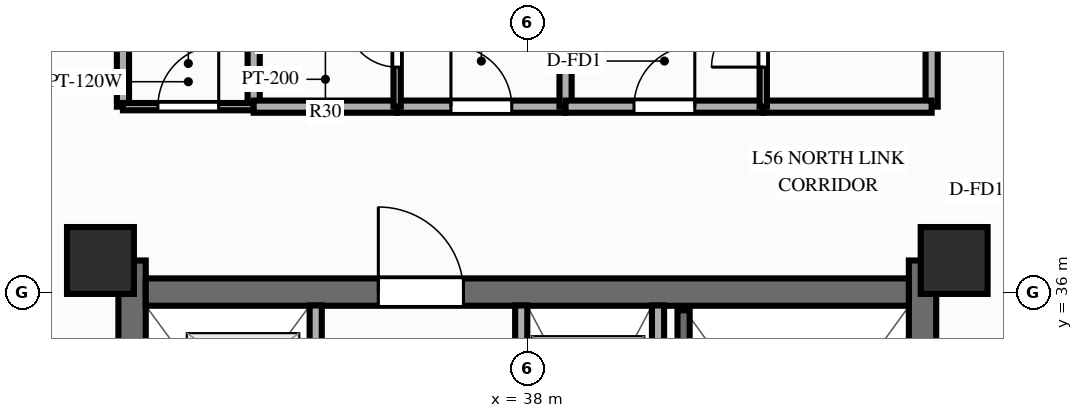
"""IFC4 building model, lengths in metres.
Left out: names, types, materials, properties, quantities, classifications, styles, units other than length and angle.
Written with IfcOpenShell. Run it as: python <this file> out.ifc"""

import sys

from ifc_helpers import new_model, si_unit, direction, frame, frame_2d, origin, origin_2d, place, context, subcontext, project, spatial, rectangle, extrude, source, transform, mapped, element, fill, save


model = new_model("IFC4")
c1 = context("Model", 3, precision=1e-05, world=origin(), true_north=direction((0.0, 1.0)))
c2 = subcontext(c1, "Body", "Model", "MODEL_VIEW")
j1 = project(units=[si_unit("LENGTHUNIT", "METRE"), si_unit("PLANEANGLEUNIT", "RADIAN")], contexts=[c1])
p1 = place(None, origin())
s1 = spatial("IfcSite", under=j1, at=p1, CompositionType="ELEMENT")
p2 = place(p1, origin())
s2 = spatial("IfcBuilding", under=s1, at=p2, CompositionType="ELEMENT")
p3 = place(p2, frame((0.0, 0.0, 179.8)))
s3 = spatial("IfcBuildingStorey", under=s2, at=p3, CompositionType="ELEMENT", Elevation=179.8)
p4 = place(p3, frame((31.5, 17.48, 0.0), z_axis=(0.0, 0.0, 1.0), x_axis=(0.0, 1.0, 0.0)))
e1 = element("IfcWall", 1, at=p4, inside=s3, PredefinedType="SHEAR", context=c2, shape_type="SweptSolid", body=[
    extrude(rectangle(XDim=19.04, YDim=0.45, at=frame_2d((9.52, 0.0))), origin(), (0.0, 0.0, 1.0), 3.0),
])
p5 = place(p4, frame((6.32, 0.0, 0.0)))
e2 = element("IfcOpeningElement", 2, at=p5, cuts=e1, PredefinedType="OPENING", context=c2, shape_type="SweptSolid", body=[
    extrude(rectangle(XDim=1.1, YDim=2.15, at=frame_2d((0.55, 1.075))), frame((0.0, 0.237, 0.0), z_axis=(0.0, -1.0, 0.0), x_axis=(1.0, 0.0, 0.0)), (0.0, 0.0, 1.0), 0.474),
])
p6 = place(p3, frame((44.5, 17.48, 0.0), z_axis=(0.0, 0.0, 1.0), x_axis=(0.0, 1.0, 0.0)))
e3 = element("IfcWall", 3, at=p6, inside=s3, PredefinedType="SHEAR", context=c2, shape_type="SweptSolid", body=[
    extrude(rectangle(XDim=19.04, YDim=0.45, at=frame_2d((9.52, 0.0))), origin(), (0.0, 0.0, 1.0), 3.0),
])
p7 = place(p6, frame((12.67, 0.0, 0.0), z_axis=(0.0, 0.0, 1.0), x_axis=(-1.0, 0.0, 0.0)))
e4 = element("IfcOpeningElement", 4, at=p7, cuts=e3, PredefinedType="OPENING", context=c2, shape_type="SweptSolid", body=[
    extrude(rectangle(XDim=1.1, YDim=2.15, at=frame_2d((0.55, 1.075))), frame((0.0, 0.237, 0.0), z_axis=(0.0, -1.0, 0.0), x_axis=(1.0, 0.0, 0.0)), (0.0, 0.0, 1.0), 0.474),
])
p8 = place(p3, frame((31.725, 36.0, 0.0), z_axis=(0.0, 0.0, 1.0), x_axis=(1.0, 0.0, 0.0)))
e5 = element("IfcWall", 5, at=p8, inside=s3, PredefinedType="SHEAR", context=c2, shape_type="SweptSolid", body=[
    extrude(rectangle(XDim=12.55, YDim=0.45, at=frame_2d((6.275, 0.0))), origin(), (0.0, 0.0, 1.0), 3.0),
])
p9 = place(p8, frame((5.225, 0.0, 0.0), z_axis=(0.0, 0.0, 1.0), x_axis=(-1.0, 0.0, 0.0)))
e6 = element("IfcOpeningElement", 6, at=p9, cuts=e5, PredefinedType="OPENING", context=c2, shape_type="SweptSolid", body=[
    extrude(rectangle(XDim=1.4, YDim=2.15, at=frame_2d((0.7, 1.075))), frame((0.0, 0.237, 0.0), z_axis=(0.0, -1.0, 0.0), x_axis=(1.0, 0.0, 0.0)), (0.0, 0.0, 1.0), 0.474),
])
m1 = source(origin(), c2, "Body", "SweptSolid", [
    extrude(rectangle(XDim=1.1, YDim=1.1, at=origin_2d()), origin(), (0.0, 0.0, 1.0), 3.0),
])
for number, where, z_axis, x_axis in (
    (7, (30.98, 36.52, 0.0), (0.0, 0.0, 1.0), (1.0, 0.0, 0.0)),
    (8, (45.02, 36.52, 0.0), (0.0, 0.0, 1.0), (1.0, 0.0, 0.0)),
):
    element("IfcColumn", number, at=place(p3, frame(where, z_axis=z_axis, x_axis=x_axis)), inside=s3, PredefinedType="COLUMN", context=c2, shape_type="MappedRepresentation", body=[
        mapped(m1, transform((0.0, 0.0, 0.0), scale=1.0)),
    ])
p10 = place(p3, frame((40.15, 31.8, 0.0), z_axis=(0.0, 0.0, 1.0), x_axis=(0.0, 1.0, 0.0)))
e9 = element("IfcWall", 9, at=p10, inside=s3, PredefinedType="PARTITIONING", context=c2, shape_type="SweptSolid", body=[
    extrude(rectangle(XDim=3.98, YDim=0.2, at=frame_2d((1.99, 0.0))), origin(), (0.0, 0.0, 1.0), 2.79),
])
p11 = place(p3, frame((40.57, 28.65, 0.0), z_axis=(0.0, 0.0, 1.0), x_axis=(0.0, 1.0, 0.0)))
e10 = element("IfcWall", 10, at=p11, inside=s3, PredefinedType="SOLIDWALL", context=c2, shape_type="SweptSolid", body=[
    extrude(rectangle(XDim=7.05, YDim=0.2, at=frame_2d((3.525, 0.0))), origin(), (0.0, 0.0, 1.0), 2.79),
])
p12 = place(p3, frame((34.52, 25.44, 0.0), z_axis=(0.0, 0.0, 1.0), x_axis=(0.0, 1.0, 0.0)))
e11 = element("IfcWall", 11, at=p12, inside=s3, PredefinedType="PARTITIONING", context=c2, shape_type="SweptSolid", body=[
    extrude(rectangle(XDim=10.34, YDim=0.2, at=frame_2d((5.17, 0.0))), origin(), (0.0, 0.0, 1.0), 2.79),
])
p13 = place(p12, frame((0.65, 0.0, 0.0)))
e12 = element("IfcOpeningElement", 12, at=p13, cuts=e11, PredefinedType="OPENING", context=c2, shape_type="SweptSolid", body=[
    extrude(rectangle(XDim=0.8, YDim=2.05, at=frame_2d((0.4, 1.025))), frame((0.0, 0.112, 0.0), z_axis=(0.0, -1.0, 0.0), x_axis=(1.0, 0.0, 0.0)), (0.0, 0.0, 1.0), 0.224),
])
p14 = place(p12, frame((2.75, 0.0, 0.0)))
e13 = element("IfcOpeningElement", 13, at=p14, cuts=e11, PredefinedType="OPENING", context=c2, shape_type="SweptSolid", body=[
    extrude(rectangle(XDim=0.8, YDim=2.05, at=frame_2d((0.4, 1.025))), frame((0.0, 0.112, 0.0), z_axis=(0.0, -1.0, 0.0), x_axis=(1.0, 0.0, 0.0)), (0.0, 0.0, 1.0), 0.224),
])
p15 = place(p12, frame((4.95, 0.0, 0.0)))
e14 = element("IfcOpeningElement", 14, at=p15, cuts=e11, PredefinedType="OPENING", context=c2, shape_type="SweptSolid", body=[
    extrude(rectangle(XDim=0.8, YDim=2.05, at=frame_2d((0.4, 1.025))), frame((0.0, 0.112, 0.0), z_axis=(0.0, -1.0, 0.0), x_axis=(1.0, 0.0, 0.0)), (0.0, 0.0, 1.0), 0.224),
])
p16 = place(p12, frame((7.01, 0.0, 0.0)))
e15 = element("IfcOpeningElement", 15, at=p16, cuts=e11, PredefinedType="OPENING", context=c2, shape_type="SweptSolid", body=[
    extrude(rectangle(XDim=1.0, YDim=2.15, at=frame_2d((0.5, 1.075))), frame((0.0, 0.112, 0.0), z_axis=(0.0, -1.0, 0.0), x_axis=(1.0, 0.0, 0.0)), (0.0, 0.0, 1.0), 0.224),
])
p17 = place(p12, frame((8.76, 0.0, 0.0)))
e16 = element("IfcOpeningElement", 16, at=p17, cuts=e11, PredefinedType="OPENING", context=c2, shape_type="SweptSolid", body=[
    extrude(rectangle(XDim=1.0, YDim=2.15, at=frame_2d((0.5, 1.075))), frame((0.0, 0.112, 0.0), z_axis=(0.0, -1.0, 0.0), x_axis=(1.0, 0.0, 0.0)), (0.0, 0.0, 1.0), 0.224),
])
p18 = place(p3, frame((37.9, 25.44, 0.0), z_axis=(0.0, 0.0, 1.0), x_axis=(0.0, 1.0, 0.0)))
e17 = element("IfcWall", 17, at=p18, inside=s3, PredefinedType="PARTITIONING", context=c2, shape_type="SweptSolid", body=[
    extrude(rectangle(XDim=10.34, YDim=0.2, at=frame_2d((5.17, 0.0))), origin(), (0.0, 0.0, 1.0), 2.79),
])
p19 = place(p18, frame((1.15, 0.0, 0.0)))
e18 = element("IfcOpeningElement", 18, at=p19, cuts=e17, PredefinedType="OPENING", context=c2, shape_type="SweptSolid", body=[
    extrude(rectangle(XDim=0.9, YDim=2.1, at=frame_2d((0.45, 1.05))), frame((0.0, 0.112, 0.0), z_axis=(0.0, -1.0, 0.0), x_axis=(1.0, 0.0, 0.0)), (0.0, 0.0, 1.0), 0.224),
])
p20 = place(p18, frame((4.2, 0.0, 0.0)))
e19 = element("IfcOpeningElement", 19, at=p20, cuts=e17, PredefinedType="OPENING", context=c2, shape_type="SweptSolid", body=[
    extrude(rectangle(XDim=0.9, YDim=2.1, at=frame_2d((0.45, 1.05))), frame((0.0, 0.112, 0.0), z_axis=(0.0, -1.0, 0.0), x_axis=(1.0, 0.0, 0.0)), (0.0, 0.0, 1.0), 0.224),
])
p21 = place(p18, frame((6.86, 0.0, 0.0)))
e20 = element("IfcOpeningElement", 20, at=p21, cuts=e17, PredefinedType="OPENING", context=c2, shape_type="SweptSolid", body=[
    extrude(rectangle(XDim=1.0, YDim=2.15, at=frame_2d((0.5, 1.075))), frame((0.0, 0.112, 0.0), z_axis=(0.0, -1.0, 0.0), x_axis=(1.0, 0.0, 0.0)), (0.0, 0.0, 1.0), 0.224),
])
p22 = place(p18, frame((8.71, 0.0, 0.0)))
e21 = element("IfcOpeningElement", 21, at=p22, cuts=e17, PredefinedType="OPENING", context=c2, shape_type="SweptSolid", body=[
    extrude(rectangle(XDim=1.0, YDim=2.15, at=frame_2d((0.5, 1.075))), frame((0.0, 0.112, 0.0), z_axis=(0.0, -1.0, 0.0), x_axis=(1.0, 0.0, 0.0)), (0.0, 0.0, 1.0), 0.224),
])
for number, where, z_axis, x_axis in (
    (22, (31.35, 39.05, 0.0), (0.0, 0.0, 1.0), (0.0, 1.0, 0.0)),
    (23, (44.65, 39.05, 0.0), (0.0, 0.0, 1.0), (0.0, 1.0, 0.0)),
):
    element("IfcWall", number, at=place(p3, frame(where, z_axis=z_axis, x_axis=x_axis)), inside=s3, PredefinedType="PARTITIONING", context=c2, shape_type="SweptSolid", body=[
        extrude(rectangle(XDim=8.8, YDim=0.2, at=frame_2d((4.4, 0.0))), origin(), (0.0, 0.0, 1.0), 2.39),
    ])
p23 = place(p3, frame((33.5, 39.05, 0.0), z_axis=(0.0, 0.0, 1.0), x_axis=(0.0, 1.0, 0.0)))
e24 = element("IfcWall", 24, at=p23, inside=s3, PredefinedType="PARTITIONING", context=c2, shape_type="SweptSolid", body=[
    extrude(rectangle(XDim=8.8, YDim=0.2, at=frame_2d((4.4, 0.0))), origin(), (0.0, 0.0, 1.0), 2.79),
])
p24 = place(p3, frame((31.35, 39.05, 0.0), z_axis=(0.0, 0.0, 1.0), x_axis=(1.0, 0.0, 0.0)))
e25 = element("IfcWall", 25, at=p24, inside=s3, PredefinedType="PARTITIONING", context=c2, shape_type="SweptSolid", body=[
    extrude(rectangle(XDim=2.15, YDim=0.12, at=frame_2d((1.075, 0.0))), origin(), (0.0, 0.0, 1.0), 2.79),
])
p25 = place(p24, frame((0.575, 0.0, 0.0)))
e26 = element("IfcOpeningElement", 26, at=p25, cuts=e25, PredefinedType="OPENING", context=c2, shape_type="SweptSolid", body=[
    extrude(rectangle(XDim=1.0, YDim=2.1, at=frame_2d((0.5, 1.05))), frame((0.0, 0.072, 0.0), z_axis=(0.0, -1.0, 0.0), x_axis=(1.0, 0.0, 0.0)), (0.0, 0.0, 1.0), 0.144),
])
p26 = place(p3, frame((33.5, 39.05, 0.0), z_axis=(0.0, 0.0, 1.0), x_axis=(1.0, 0.0, 0.0)))
e27 = element("IfcWall", 27, at=p26, inside=s3, PredefinedType="PARTITIONING", context=c2, shape_type="SweptSolid", body=[
    extrude(rectangle(XDim=2.359, YDim=0.2, at=frame_2d((1.18, 0.0))), origin(), (0.0, 0.0, 1.0), 2.79),
])
p27 = place(p3, frame((35.859, 39.05, 0.0), z_axis=(0.0, 0.0, 1.0), x_axis=(1.0, 0.0, 0.0)))
e28 = element("IfcWall", 28, at=p27, inside=s3, PredefinedType="PARTITIONING", context=c2, shape_type="SweptSolid", body=[
    extrude(rectangle(XDim=2.77, YDim=0.2, at=frame_2d((1.385, 0.0))), origin(), (0.0, 0.0, 1.0), 2.79),
])
p28 = place(p27, frame((0.885, 0.0, 0.0)))
e29 = element("IfcOpeningElement", 29, at=p28, cuts=e28, PredefinedType="OPENING", context=c2, shape_type="SweptSolid", body=[
    extrude(rectangle(XDim=1.0, YDim=2.15, at=frame_2d((0.5, 1.075))), frame((0.0, 0.112, 0.0), z_axis=(0.0, -1.0, 0.0), x_axis=(1.0, 0.0, 0.0)), (0.0, 0.0, 1.0), 0.224),
])
p29 = place(p3, frame((35.859, 39.05, 0.0), z_axis=(0.0, 0.0, 1.0), x_axis=(0.0, 1.0, 0.0)))
e30 = element("IfcWall", 30, at=p29, inside=s3, PredefinedType="PARTITIONING", context=c2, shape_type="SweptSolid", body=[
    extrude(rectangle(XDim=2.15, YDim=0.12, at=frame_2d((1.075, 0.0))), origin(), (0.0, 0.0, 1.0), 2.79),
])
p30 = place(p29, frame((0.65, 0.0, 0.0)))
e31 = element("IfcOpeningElement", 31, at=p30, cuts=e30, PredefinedType="OPENING", context=c2, shape_type="SweptSolid", body=[
    extrude(rectangle(XDim=0.85, YDim=2.05, at=frame_2d((0.425, 1.025))), frame((0.0, 0.072, 0.0), z_axis=(0.0, -1.0, 0.0), x_axis=(1.0, 0.0, 0.0)), (0.0, 0.0, 1.0), 0.144),
])
p31 = place(p3, frame((38.629, 39.05, 0.0), z_axis=(0.0, 0.0, 1.0), x_axis=(0.0, 1.0, 0.0)))
e32 = element("IfcWall", 32, at=p31, inside=s3, PredefinedType="PARTITIONING", context=c2, shape_type="SweptSolid", body=[
    extrude(rectangle(XDim=8.8, YDim=0.2, at=frame_2d((4.4, 0.0))), origin(), (0.0, 0.0, 1.0), 2.79),
])
p32 = place(p3, frame((38.629, 39.05, 0.0), z_axis=(0.0, 0.0, 1.0), x_axis=(1.0, 0.0, 0.0)))
e33 = element("IfcWall", 33, at=p32, inside=s3, PredefinedType="PARTITIONING", context=c2, shape_type="SweptSolid", body=[
    extrude(rectangle(XDim=3.251, YDim=0.2, at=frame_2d((1.626, 0.0))), origin(), (0.0, 0.0, 1.0), 2.79),
])
p33 = place(p32, frame((1.126, 0.0, 0.0)))
e34 = element("IfcOpeningElement", 34, at=p33, cuts=e33, PredefinedType="OPENING", context=c2, shape_type="SweptSolid", body=[
    extrude(rectangle(XDim=1.0, YDim=2.15, at=frame_2d((0.5, 1.075))), frame((0.0, 0.112, 0.0), z_axis=(0.0, -1.0, 0.0), x_axis=(1.0, 0.0, 0.0)), (0.0, 0.0, 1.0), 0.224),
])
p34 = place(p3, frame((41.88, 39.05, 0.0), z_axis=(0.0, 0.0, 1.0), x_axis=(1.0, 0.0, 0.0)))
e35 = element("IfcWall", 35, at=p34, inside=s3, PredefinedType="PARTITIONING", context=c2, shape_type="SweptSolid", body=[
    extrude(rectangle(XDim=2.77, YDim=0.2, at=frame_2d((1.385, 0.0))), origin(), (0.0, 0.0, 1.0), 2.79),
])
p35 = place(p3, frame((41.88, 39.05, 0.0), z_axis=(0.0, 0.0, 1.0), x_axis=(0.0, 1.0, 0.0)))
e36 = element("IfcWall", 36, at=p35, inside=s3, PredefinedType="PARTITIONING", context=c2, shape_type="SweptSolid", body=[
    extrude(rectangle(XDim=2.15, YDim=0.12, at=frame_2d((1.075, 0.0))), origin(), (0.0, 0.0, 1.0), 2.79),
])
p36 = place(p35, frame((0.65, 0.0, 0.0)))
e37 = element("IfcOpeningElement", 37, at=p36, cuts=e36, PredefinedType="OPENING", context=c2, shape_type="SweptSolid", body=[
    extrude(rectangle(XDim=0.85, YDim=2.05, at=frame_2d((0.425, 1.025))), frame((0.0, 0.072, 0.0), z_axis=(0.0, -1.0, 0.0), x_axis=(1.0, 0.0, 0.0)), (0.0, 0.0, 1.0), 0.144),
])
m2 = source(origin(), c2, "Body", "SweptSolid", [
    extrude(rectangle(XDim=1.4, YDim=2.15, at=frame_2d((0.7, 1.075))), frame((0.0, 0.025, 0.0), z_axis=(0.0, -1.0, 0.0), x_axis=(1.0, 0.0, 0.0)), (0.0, 0.0, 1.0), 0.05),
])
p37 = place(p9, origin())
e38 = element("IfcDoor", 38, at=p37, inside=s3, OperationType="SINGLE_SWING_RIGHT", PredefinedType="DOOR", context=c2, shape_type="MappedRepresentation", body=[
    mapped(m2, transform((0.0, 0.0, 0.0), scale=1.0)),
])
fill(e6, e38)
m3 = source(origin(), c2, "Body", "SweptSolid", [
    extrude(rectangle(XDim=1.0, YDim=2.1, at=frame_2d((0.5, 1.05))), frame((0.0, 0.025, 0.0), z_axis=(0.0, -1.0, 0.0), x_axis=(1.0, 0.0, 0.0)), (0.0, 0.0, 1.0), 0.05),
])
p38 = place(p25, origin())
e39 = element("IfcDoor", 39, at=p38, inside=s3, OperationType="SINGLE_SWING_RIGHT", PredefinedType="DOOR", context=c2, shape_type="MappedRepresentation", body=[
    mapped(m3, transform((0.0, 0.0, 0.0), scale=1.0)),
])
fill(e26, e39)
m4 = source(origin(), c2, "Body", "SweptSolid", [
    extrude(rectangle(XDim=1.0, YDim=2.15, at=frame_2d((0.5, 1.075))), frame((0.0, 0.025, 0.0), z_axis=(0.0, -1.0, 0.0), x_axis=(1.0, 0.0, 0.0)), (0.0, 0.0, 1.0), 0.05),
])
p39 = place(p28, origin())
e40 = element("IfcDoor", 40, at=p39, inside=s3, OperationType="SINGLE_SWING_LEFT", PredefinedType="DOOR", context=c2, shape_type="MappedRepresentation", body=[
    mapped(m4, transform((0.0, 0.0, 0.0), scale=1.0)),
])
fill(e29, e40)
m5 = source(origin(), c2, "Body", "SweptSolid", [
    extrude(rectangle(XDim=0.85, YDim=2.05, at=frame_2d((0.425, 1.025))), frame((0.0, 0.025, 0.0), z_axis=(0.0, -1.0, 0.0), x_axis=(1.0, 0.0, 0.0)), (0.0, 0.0, 1.0), 0.05),
])
p40 = place(p30, origin())
e41 = element("IfcDoor", 41, at=p40, inside=s3, OperationType="SINGLE_SWING_RIGHT", PredefinedType="DOOR", context=c2, shape_type="MappedRepresentation", body=[
    mapped(m5, transform((0.0, 0.0, 0.0), scale=1.0)),
])
fill(e31, e41)
p41 = place(p33, origin())
e42 = element("IfcDoor", 42, at=p41, inside=s3, OperationType="SINGLE_SWING_RIGHT", PredefinedType="DOOR", context=c2, shape_type="MappedRepresentation", body=[
    mapped(m4, transform((0.0, 0.0, 0.0), scale=1.0)),
])
fill(e34, e42)
p42 = place(p36, origin())
e43 = element("IfcDoor", 43, at=p42, inside=s3, OperationType="SINGLE_SWING_LEFT", PredefinedType="DOOR", context=c2, shape_type="MappedRepresentation", body=[
    mapped(m5, transform((0.0, 0.0, 0.0), scale=1.0)),
])
fill(e37, e43)
save(model, sys.argv[1])
